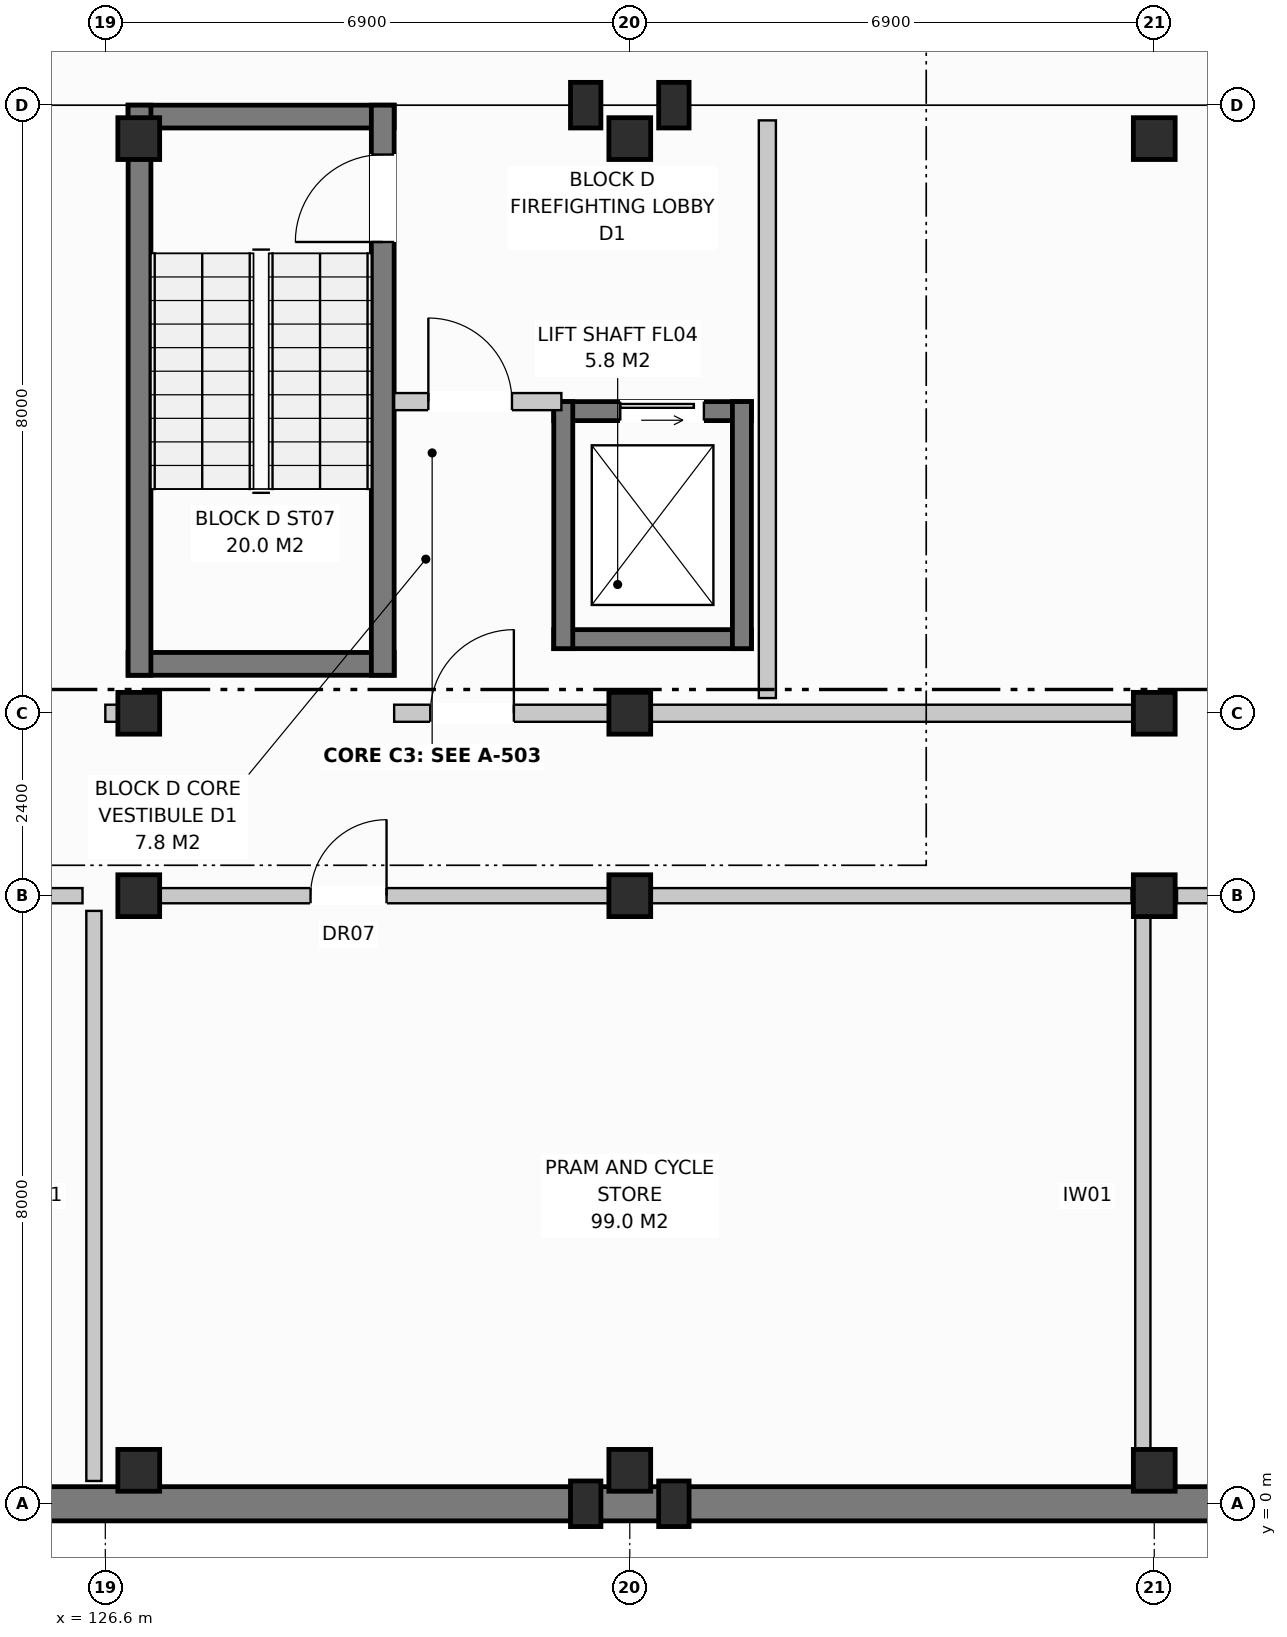
"""IFC4 building model, lengths in metres.
Left out: names, types, materials, properties, quantities, classifications, styles, units other than length and angle.
Written with IfcOpenShell. Run it as: python <this file> out.ifc"""

import sys

from ifc_helpers import new_model, si_unit, direction, frame, frame_2d, origin, origin_with_axes, origin_2d, place, context, subcontext, project, spatial, rectangle, extrude, element, fill, save


model = new_model("IFC4")
c1 = context("Model", 3, precision=1e-05, world=origin(), true_north=direction((0.0, 1.0)))
c2 = subcontext(c1, "Body", "Model", "MODEL_VIEW")
j1 = project(units=[si_unit("LENGTHUNIT", "METRE"), si_unit("PLANEANGLEUNIT", "RADIAN")], contexts=[c1])
p1 = place(None, origin())
s1 = spatial("IfcSite", under=j1, at=p1, CompositionType="ELEMENT")
p2 = place(p1, origin())
s2 = spatial("IfcBuilding", under=s1, at=p2, CompositionType="ELEMENT")
p3 = place(p2, frame((0.0, 0.0, -3.8)))
s3 = spatial("IfcBuildingStorey", under=s2, at=p3, CompositionType="ELEMENT", Elevation=-3.8)
for number, where, z_axis, x_axis in (
    (1, (127.04, 0.44, 0.0), (0.0, 0.0, 1.0), (1.0, 0.0, 0.0)),
    (2, (127.04, 8.0, 0.0), (0.0, 0.0, 1.0), (1.0, 0.0, 0.0)),
    (3, (127.04, 10.4, 0.0), (0.0, 0.0, 1.0), (1.0, 0.0, 0.0)),
    (4, (127.04, 17.96, 0.0), (0.0, 0.0, 1.0), (1.0, 0.0, 0.0)),
    (5, (133.5, 0.44, 0.0), (0.0, 0.0, 1.0), (1.0, 0.0, 0.0)),
    (6, (133.5, 8.0, 0.0), (0.0, 0.0, 1.0), (1.0, 0.0, 0.0)),
    (7, (133.5, 10.4, 0.0), (0.0, 0.0, 1.0), (1.0, 0.0, 0.0)),
    (8, (133.5, 17.96, 0.0), (0.0, 0.0, 1.0), (1.0, 0.0, 0.0)),
    (9, (140.4, 0.44, 0.0), (0.0, 0.0, 1.0), (1.0, 0.0, 0.0)),
    (10, (140.4, 8.0, 0.0), (0.0, 0.0, 1.0), (1.0, 0.0, 0.0)),
    (11, (140.4, 10.4, 0.0), (0.0, 0.0, 1.0), (1.0, 0.0, 0.0)),
    (12, (140.4, 17.96, 0.0), (0.0, 0.0, 1.0), (1.0, 0.0, 0.0)),
):
    element("IfcColumn", number, at=place(p3, frame(where, z_axis=z_axis, x_axis=x_axis)), inside=s3, PredefinedType="COLUMN", context=c2, shape_type="SweptSolid", body=[
        extrude(rectangle(XDim=0.55, YDim=0.55, at=origin_2d()), origin(), (0.0, 0.0, 1.0), 3.8),
    ])
for number, where, z_axis, x_axis in (
    (13, (132.92, 0.0, 0.0), (0.0, 0.0, 1.0), (1.0, 0.0, 0.0)),
    (14, (132.92, 18.4, 0.0), (0.0, 0.0, 1.0), (1.0, 0.0, 0.0)),
    (15, (134.08, 0.0, 0.0), (0.0, 0.0, 1.0), (1.0, 0.0, 0.0)),
    (16, (134.08, 18.4, 0.0), (0.0, 0.0, 1.0), (1.0, 0.0, 0.0)),
):
    element("IfcColumn", number, at=place(p3, frame(where, z_axis=z_axis, x_axis=x_axis)), inside=s3, PredefinedType="PILASTER", context=c2, shape_type="SweptSolid", body=[
        extrude(rectangle(XDim=0.4, YDim=0.6, at=origin_2d()), origin(), (0.0, 0.0, 1.0), 3.8),
    ])
p4 = place(p3, origin_with_axes())
e17 = element("IfcWall", 17, at=p4, inside=s3, PredefinedType="STANDARD", context=c2, shape_type="SweptSolid", body=[
    extrude(rectangle(XDim=168.0, YDim=0.45, at=frame_2d((84.0, 0.0))), origin(), (0.0, 0.0, 1.0), 3.48),
])
for number, where, z_axis, x_axis in (
    (18, (126.9, 18.25, 0.0), (0.0, 0.0, 1.0), (1.0, 0.0, 0.0)),
    (19, (126.9, 11.05, 0.0), (0.0, 0.0, 1.0), (1.0, 0.0, 0.0)),
):
    element("IfcWall", number, at=place(p3, frame(where, z_axis=z_axis, x_axis=x_axis)), inside=s3, PredefinedType="SHEAR", context=c2, shape_type="SweptSolid", body=[
        extrude(rectangle(XDim=3.5, YDim=0.3, at=frame_2d((1.75, 0.0))), origin(), (0.0, 0.0, 1.0), 3.48),
    ])
p5 = place(p3, frame((127.05, 10.9, 0.0), z_axis=(0.0, 0.0, 1.0), x_axis=(0.0, 1.0, 0.0)))
e20 = element("IfcWall", 20, at=p5, inside=s3, PredefinedType="SHEAR", context=c2, shape_type="SweptSolid", body=[
    extrude(rectangle(XDim=7.5, YDim=0.3, at=frame_2d((3.75, 0.0))), origin(), (0.0, 0.0, 1.0), 3.48),
])
p6 = place(p3, frame((130.25, 10.9, 0.0), z_axis=(0.0, 0.0, 1.0), x_axis=(0.0, 1.0, 0.0)))
e21 = element("IfcWall", 21, at=p6, inside=s3, PredefinedType="SHEAR", context=c2, shape_type="SweptSolid", body=[
    extrude(rectangle(XDim=7.5, YDim=0.3, at=frame_2d((3.75, 0.0))), origin(), (0.0, 0.0, 1.0), 3.48),
])
p7 = place(p6, frame((5.7, 0.0, 0.0)))
e22 = element("IfcOpeningElement", 22, at=p7, cuts=e21, PredefinedType="OPENING", context=c2, shape_type="SweptSolid", body=[
    extrude(rectangle(XDim=1.15, YDim=2.15, at=frame_2d((0.575, 1.075))), frame((0.0, 0.162, 0.0), z_axis=(0.0, -1.0, 0.0), x_axis=(1.0, 0.0, 0.0)), (0.0, 0.0, 1.0), 0.324),
])
p8 = place(p3, frame((132.5, 14.375, 0.0), z_axis=(0.0, 0.0, 1.0), x_axis=(1.0, 0.0, 0.0)))
e23 = element("IfcWall", 23, at=p8, inside=s3, PredefinedType="SHEAR", context=c2, shape_type="SweptSolid", body=[
    extrude(rectangle(XDim=2.6, YDim=0.25, at=frame_2d((1.3, 0.0))), origin(), (0.0, 0.0, 1.0), 3.48),
])
p9 = place(p8, frame((0.875, 0.0, 0.0)))
e24 = element("IfcOpeningElement", 24, at=p9, cuts=e23, PredefinedType="OPENING", context=c2, shape_type="SweptSolid", body=[
    extrude(rectangle(XDim=1.1, YDim=2.1, at=frame_2d((0.55, 1.05))), frame((0.0, 0.137, 0.0), z_axis=(0.0, -1.0, 0.0), x_axis=(1.0, 0.0, 0.0)), (0.0, 0.0, 1.0), 0.274),
])
p10 = place(p3, frame((132.5, 11.375, 0.0), z_axis=(0.0, 0.0, 1.0), x_axis=(1.0, 0.0, 0.0)))
e25 = element("IfcWall", 25, at=p10, inside=s3, PredefinedType="SHEAR", context=c2, shape_type="SweptSolid", body=[
    extrude(rectangle(XDim=2.6, YDim=0.25, at=frame_2d((1.3, 0.0))), origin(), (0.0, 0.0, 1.0), 3.48),
])
for number, where, z_axis, x_axis in (
    (26, (132.625, 11.25, 0.0), (0.0, 0.0, 1.0), (0.0, 1.0, 0.0)),
    (27, (134.975, 11.25, 0.0), (0.0, 0.0, 1.0), (0.0, 1.0, 0.0)),
):
    element("IfcWall", number, at=place(p3, frame(where, z_axis=z_axis, x_axis=x_axis)), inside=s3, PredefinedType="SHEAR", context=c2, shape_type="SweptSolid", body=[
        extrude(rectangle(XDim=3.25, YDim=0.25, at=frame_2d((1.625, 0.0))), origin(), (0.0, 0.0, 1.0), 3.48),
    ])
p11 = place(p3, frame((135.31, 10.6, 0.0), z_axis=(0.0, 0.0, 1.0), x_axis=(0.0, 1.0, 0.0)))
e28 = element("IfcWall", 28, at=p11, inside=s3, PredefinedType="PARTITIONING", context=c2, shape_type="SweptSolid", body=[
    extrude(rectangle(XDim=7.6, YDim=0.225, at=frame_2d((3.8, 0.0))), origin(), (0.0, 0.0, 1.0), 3.19),
])
p12 = place(p3, frame((130.4, 14.5, 0.0), z_axis=(0.0, 0.0, 1.0), x_axis=(1.0, 0.0, 0.0)))
e29 = element("IfcWall", 29, at=p12, inside=s3, PredefinedType="PARTITIONING", context=c2, shape_type="SweptSolid", body=[
    extrude(rectangle(XDim=2.2, YDim=0.225, at=frame_2d((1.1, 0.0))), origin(), (0.0, 0.0, 1.0), 3.48),
])
p13 = place(p12, frame((0.45, 0.0, 0.0)))
e30 = element("IfcOpeningElement", 30, at=p13, cuts=e29, PredefinedType="OPENING", context=c2, shape_type="SweptSolid", body=[
    extrude(rectangle(XDim=1.1, YDim=2.15, at=frame_2d((0.55, 1.075))), frame((0.0, 0.125, 0.0), z_axis=(0.0, -1.0, 0.0), x_axis=(1.0, 0.0, 0.0)), (0.0, 0.0, 1.0), 0.249),
])
p14 = place(p3, frame((126.6, 10.4, 0.0), z_axis=(0.0, 0.0, 1.0), x_axis=(1.0, 0.0, 0.0)))
e31 = element("IfcWall", 31, at=p14, inside=s3, PredefinedType="PARTITIONING", context=c2, shape_type="SweptSolid", body=[
    extrude(rectangle(XDim=0.3, YDim=0.225, at=frame_2d((0.15, 0.0))), origin(), (0.0, 0.0, 1.0), 3.48),
])
p15 = place(p3, frame((130.4, 10.4, 0.0), z_axis=(0.0, 0.0, 1.0), x_axis=(1.0, 0.0, 0.0)))
e32 = element("IfcWall", 32, at=p15, inside=s3, PredefinedType="PARTITIONING", context=c2, shape_type="SweptSolid", body=[
    extrude(rectangle(XDim=10.0, YDim=0.225, at=frame_2d((5.0, 0.0))), origin(), (0.0, 0.0, 1.0), 2.92),
])
p16 = place(p15, frame((0.475, 0.0, 0.0)))
e33 = element("IfcOpeningElement", 33, at=p16, cuts=e32, PredefinedType="OPENING", context=c2, shape_type="SweptSolid", body=[
    extrude(rectangle(XDim=1.1, YDim=2.15, at=frame_2d((0.55, 1.075))), frame((0.0, 0.125, 0.0), z_axis=(0.0, -1.0, 0.0), x_axis=(1.0, 0.0, 0.0)), (0.0, 0.0, 1.0), 0.249),
])
p17 = place(p3, frame((113.1, 8.0, 0.0), z_axis=(0.0, 0.0, 1.0), x_axis=(1.0, 0.0, 0.0)))
e34 = element("IfcWall", 34, at=p17, inside=s3, PredefinedType="PARTITIONING", context=c2, shape_type="SweptSolid", body=[
    extrude(rectangle(XDim=13.2, YDim=0.2, at=frame_2d((6.6, 0.0))), origin(), (0.0, 0.0, 1.0), 2.92),
])
p18 = place(p17, frame((2.4, 0.0, 0.0)))
e35 = element("IfcOpeningElement", 35, at=p18, cuts=e34, PredefinedType="OPENING", context=c2, shape_type="SweptSolid", body=[
    extrude(rectangle(XDim=1.0, YDim=2.15, at=frame_2d((0.5, 1.075))), frame((0.0, 0.112, 0.0), z_axis=(0.0, -1.0, 0.0), x_axis=(1.0, 0.0, 0.0)), (0.0, 0.0, 1.0), 0.224),
])
p19 = place(p3, frame((126.45, 0.3, 0.0), z_axis=(0.0, 0.0, 1.0), x_axis=(0.0, 1.0, 0.0)))
e36 = element("IfcWall", 36, at=p19, inside=s3, PredefinedType="PARTITIONING", context=c2, shape_type="SweptSolid", body=[
    extrude(rectangle(XDim=7.5, YDim=0.2, at=frame_2d((3.75, 0.0))), origin(), (0.0, 0.0, 1.0), 3.48),
])
p20 = place(p3, frame((126.9, 8.0, 0.0), z_axis=(0.0, 0.0, 1.0), x_axis=(1.0, 0.0, 0.0)))
e37 = element("IfcWall", 37, at=p20, inside=s3, PredefinedType="PARTITIONING", context=c2, shape_type="SweptSolid", body=[
    extrude(rectangle(XDim=13.2, YDim=0.2, at=frame_2d((6.6, 0.0))), origin(), (0.0, 0.0, 1.0), 2.92),
])
p21 = place(p20, frame((2.4, 0.0, 0.0)))
e38 = element("IfcOpeningElement", 38, at=p21, cuts=e37, PredefinedType="OPENING", context=c2, shape_type="SweptSolid", body=[
    extrude(rectangle(XDim=1.0, YDim=2.15, at=frame_2d((0.5, 1.075))), frame((0.0, 0.112, 0.0), z_axis=(0.0, -1.0, 0.0), x_axis=(1.0, 0.0, 0.0)), (0.0, 0.0, 1.0), 0.224),
])
p22 = place(p3, frame((140.25, 0.3, 0.0), z_axis=(0.0, 0.0, 1.0), x_axis=(0.0, 1.0, 0.0)))
e39 = element("IfcWall", 39, at=p22, inside=s3, PredefinedType="PARTITIONING", context=c2, shape_type="SweptSolid", body=[
    extrude(rectangle(XDim=7.5, YDim=0.2, at=frame_2d((3.75, 0.0))), origin(), (0.0, 0.0, 1.0), 3.48),
])
p23 = place(p3, frame((140.7, 8.0, 0.0), z_axis=(0.0, 0.0, 1.0), x_axis=(1.0, 0.0, 0.0)))
e40 = element("IfcWall", 40, at=p23, inside=s3, PredefinedType="PARTITIONING", context=c2, shape_type="SweptSolid", body=[
    extrude(rectangle(XDim=13.2, YDim=0.2, at=frame_2d((6.6, 0.0))), origin(), (0.0, 0.0, 1.0), 2.92),
])
p24 = place(p23, frame((2.4, 0.0, 0.0)))
e41 = element("IfcOpeningElement", 41, at=p24, cuts=e40, PredefinedType="OPENING", context=c2, shape_type="SweptSolid", body=[
    extrude(rectangle(XDim=1.0, YDim=2.15, at=frame_2d((0.5, 1.075))), frame((0.0, 0.112, 0.0), z_axis=(0.0, -1.0, 0.0), x_axis=(1.0, 0.0, 0.0)), (0.0, 0.0, 1.0), 0.224),
])
p25 = place(p7, origin_with_axes())
e42 = element("IfcDoor", 42, at=p25, inside=s3, OperationType="SINGLE_SWING_LEFT", PredefinedType="DOOR", context=c2, shape_type="SweptSolid", body=[
    extrude(rectangle(XDim=1.15, YDim=2.15, at=frame_2d((0.575, 1.075))), frame((0.0, 0.025, 0.0), z_axis=(0.0, -1.0, 0.0), x_axis=(1.0, 0.0, 0.0)), (0.0, 0.0, 1.0), 0.05),
])
fill(e22, e42)
p26 = place(p9, origin_with_axes())
e43 = element("IfcDoor", 43, at=p26, inside=s3, OperationType="SLIDING_TO_LEFT", PredefinedType="DOOR", context=c2, shape_type="SweptSolid", body=[
    extrude(rectangle(XDim=1.1, YDim=2.1, at=frame_2d((0.55, 1.05))), frame((0.0, 0.025, 0.0), z_axis=(0.0, -1.0, 0.0), x_axis=(1.0, 0.0, 0.0)), (0.0, 0.0, 1.0), 0.05),
])
fill(e24, e43)
p27 = place(p13, origin_with_axes())
e44 = element("IfcDoor", 44, at=p27, inside=s3, OperationType="SINGLE_SWING_LEFT", PredefinedType="DOOR", context=c2, shape_type="SweptSolid", body=[
    extrude(rectangle(XDim=1.1, YDim=2.15, at=frame_2d((0.55, 1.075))), frame((0.0, 0.025, 0.0), z_axis=(0.0, -1.0, 0.0), x_axis=(1.0, 0.0, 0.0)), (0.0, 0.0, 1.0), 0.05),
])
fill(e30, e44)
p28 = place(p16, origin_with_axes())
e45 = element("IfcDoor", 45, at=p28, inside=s3, OperationType="SINGLE_SWING_RIGHT", PredefinedType="DOOR", context=c2, shape_type="SweptSolid", body=[
    extrude(rectangle(XDim=1.1, YDim=2.15, at=frame_2d((0.55, 1.075))), frame((0.0, 0.025, 0.0), z_axis=(0.0, -1.0, 0.0), x_axis=(1.0, 0.0, 0.0)), (0.0, 0.0, 1.0), 0.05),
])
fill(e33, e45)
p29 = place(p21, origin_with_axes())
e46 = element("IfcDoor", 46, at=p29, inside=s3, OperationType="SINGLE_SWING_RIGHT", PredefinedType="DOOR", context=c2, shape_type="SweptSolid", body=[
    extrude(rectangle(XDim=1.0, YDim=2.15, at=frame_2d((0.5, 1.075))), frame((0.0, 0.025, 0.0), z_axis=(0.0, -1.0, 0.0), x_axis=(1.0, 0.0, 0.0)), (0.0, 0.0, 1.0), 0.05),
])
fill(e38, e46)
save(model, sys.argv[1])
